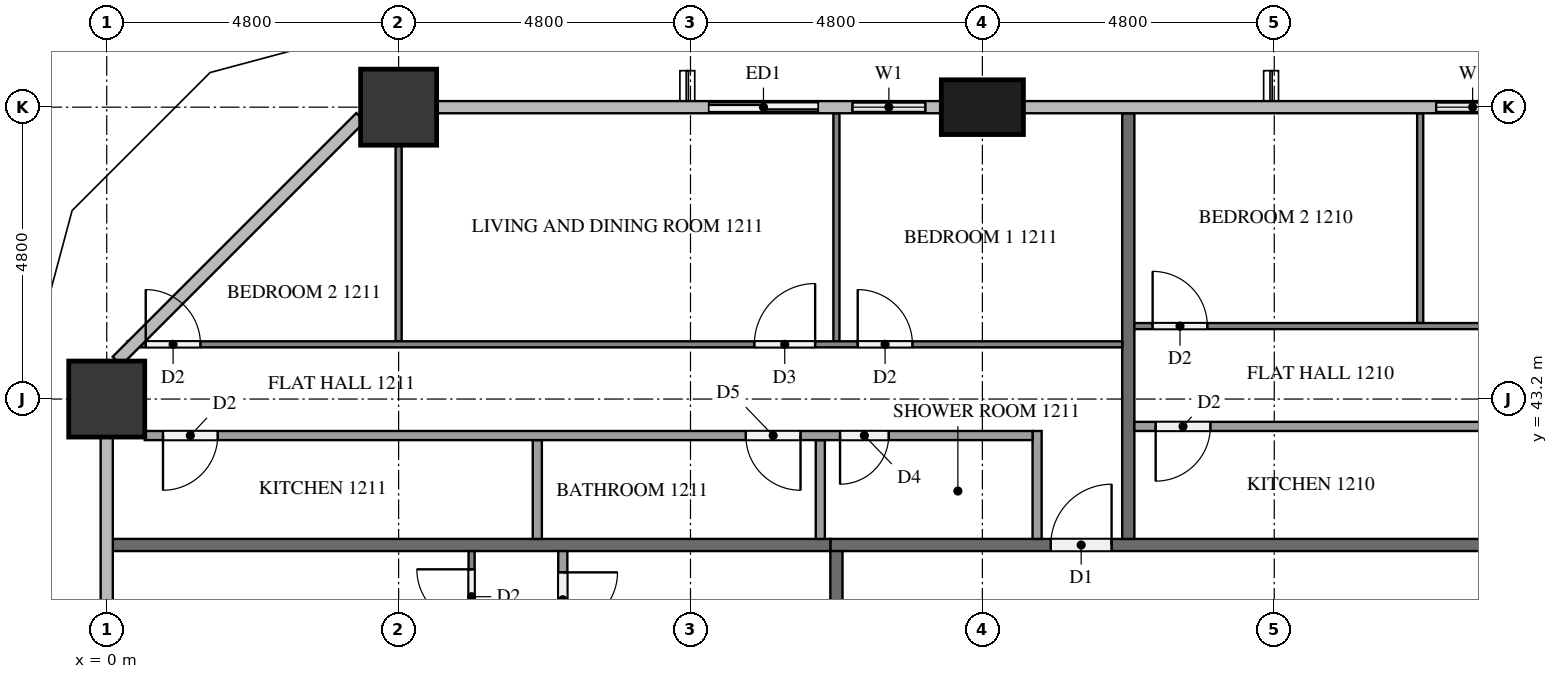
"""IFC4 building model, lengths in metres.
Left out: names, types, materials, properties, quantities, classifications, styles, units other than length and angle.
Written with IfcOpenShell. Run it as: python <this file> out.ifc"""

import sys

from ifc_helpers import new_model, si_unit, direction, frame, frame_2d, origin, origin_2d, place, context, subcontext, project, spatial, rectangle, extrude, element, fill, save


model = new_model("IFC4")
c1 = context("Model", 3, precision=1e-05, world=origin(), true_north=direction((0.0, 1.0)))
c2 = subcontext(c1, "Body", "Model", "MODEL_VIEW")
j1 = project(units=[si_unit("LENGTHUNIT", "METRE"), si_unit("PLANEANGLEUNIT", "RADIAN")], contexts=[c1])
p1 = place(None, origin())
s1 = spatial("IfcSite", under=j1, at=p1, CompositionType="ELEMENT")
p2 = place(p1, origin())
s2 = spatial("IfcBuilding", under=s1, at=p2, CompositionType="ELEMENT")
p3 = place(p2, frame((0.0, 0.0, 50.4)))
s3 = spatial("IfcBuildingStorey", under=s2, at=p3, CompositionType="ELEMENT", Elevation=50.4)
p4 = place(p3, frame((14.4, 48.0, 0.0), z_axis=(0.0, 0.0, 1.0), x_axis=(1.0, 0.0, 0.0)))
e1 = element("IfcColumn", 1, at=p4, inside=s3, PredefinedType="COLUMN", context=c2, shape_type="SweptSolid", body=[
    extrude(rectangle(XDim=1.35, YDim=0.9, at=origin_2d()), origin(), (0.0, 0.0, 1.0), 3.1),
])
for number, where, z_axis, x_axis in (
    (2, (4.8, 48.0, 0.0), (0.0, 0.0, 1.0), (1.0, 0.0, 0.0)),
    (3, (0.0, 43.2, 0.0), (0.0, 0.0, 1.0), (1.0, 0.0, 0.0)),
):
    element("IfcColumn", number, at=place(p3, frame(where, z_axis=z_axis, x_axis=x_axis)), inside=s3, PredefinedType="COLUMN", context=c2, shape_type="SweptSolid", body=[
        extrude(rectangle(XDim=1.25, YDim=1.25, at=origin_2d()), origin(), (0.0, 0.0, 1.0), 3.1),
    ])
p5 = place(p3, frame((23.325, 48.0, 0.0), z_axis=(0.0, 0.0, 1.0), x_axis=(-1.0, 0.0, 0.0)))
e4 = element("IfcWall", 4, at=p5, inside=s3, PredefinedType="SOLIDWALL", context=c2, shape_type="SweptSolid", body=[
    extrude(rectangle(XDim=1.725, YDim=0.15, at=frame_2d((0.862, 0.0))), origin(), (0.0, 0.0, 1.0), 3.1),
])
p6 = place(p5, frame((0.262, 0.0, 0.9)))
e5 = element("IfcOpeningElement", 5, at=p6, cuts=e4, PredefinedType="OPENING", context=c2, shape_type="SweptSolid", body=[
    extrude(rectangle(XDim=1.2, YDim=1.4, at=frame_2d((0.6, 0.7))), frame((0.0, 0.085, 0.0), z_axis=(0.0, -1.0, 0.0), x_axis=(1.0, 0.0, 0.0)), (0.0, 0.0, 1.0), 0.17),
])
p7 = place(p3, frame((13.725, 48.0, 0.0), z_axis=(0.0, 0.0, 1.0), x_axis=(-1.0, 0.0, 0.0)))
e6 = element("IfcWall", 6, at=p7, inside=s3, PredefinedType="SOLIDWALL", context=c2, shape_type="SweptSolid", body=[
    extrude(rectangle(XDim=4.125, YDim=0.15, at=frame_2d((2.062, 0.0))), origin(), (0.0, 0.0, 1.0), 3.1),
])
p8 = place(p7, frame((0.262, 0.0, 0.9)))
e7 = element("IfcOpeningElement", 7, at=p8, cuts=e6, PredefinedType="OPENING", context=c2, shape_type="SweptSolid", body=[
    extrude(rectangle(XDim=1.2, YDim=1.4, at=frame_2d((0.6, 0.7))), frame((0.0, 0.085, 0.0), z_axis=(0.0, -1.0, 0.0), x_axis=(1.0, 0.0, 0.0)), (0.0, 0.0, 1.0), 0.17),
])
p9 = place(p7, frame((2.025, 0.0, 0.0)))
e8 = element("IfcOpeningElement", 8, at=p9, cuts=e6, PredefinedType="OPENING", context=c2, shape_type="SweptSolid", body=[
    extrude(rectangle(XDim=1.8, YDim=2.4, at=frame_2d((0.9, 1.2))), frame((0.0, 0.085, 0.0), z_axis=(0.0, -1.0, 0.0), x_axis=(1.0, 0.0, 0.0)), (0.0, 0.0, 1.0), 0.17),
])
p10 = place(p3, frame((11.9, 40.8, 0.0), z_axis=(0.0, 0.0, 1.0), x_axis=(1.0, 0.0, 0.0)))
e9 = element("IfcWall", 9, at=p10, inside=s3, PredefinedType="PARTITIONING", context=c2, shape_type="SweptSolid", body=[
    extrude(rectangle(XDim=38.6, YDim=0.2, at=frame_2d((19.3, 0.0))), origin(), (0.0, 0.0, 1.0), 3.1),
])
p11 = place(p10, frame((33.975, 0.0, 0.0)))
e10 = element("IfcOpeningElement", 10, at=p11, cuts=e9, PredefinedType="OPENING", context=c2, shape_type="SweptSolid", body=[
    extrude(rectangle(XDim=1.0, YDim=2.1, at=frame_2d((0.5, 1.05))), frame((0.0, 0.11, 0.0), z_axis=(0.0, -1.0, 0.0), x_axis=(1.0, 0.0, 0.0)), (0.0, 0.0, 1.0), 0.22),
])
p12 = place(p10, frame((19.575, 0.0, 0.0)))
e11 = element("IfcOpeningElement", 11, at=p12, cuts=e9, PredefinedType="OPENING", context=c2, shape_type="SweptSolid", body=[
    extrude(rectangle(XDim=1.0, YDim=2.1, at=frame_2d((0.5, 1.05))), frame((0.0, 0.11, 0.0), z_axis=(0.0, -1.0, 0.0), x_axis=(1.0, 0.0, 0.0)), (0.0, 0.0, 1.0), 0.22),
])
p13 = place(p10, frame((18.025, 0.0, 0.0)))
e12 = element("IfcOpeningElement", 12, at=p13, cuts=e9, PredefinedType="OPENING", context=c2, shape_type="SweptSolid", body=[
    extrude(rectangle(XDim=1.0, YDim=2.1, at=frame_2d((0.5, 1.05))), frame((0.0, 0.11, 0.0), z_axis=(0.0, -1.0, 0.0), x_axis=(1.0, 0.0, 0.0)), (0.0, 0.0, 1.0), 0.22),
])
p14 = place(p10, frame((3.625, 0.0, 0.0)))
e13 = element("IfcOpeningElement", 13, at=p14, cuts=e9, PredefinedType="OPENING", context=c2, shape_type="SweptSolid", body=[
    extrude(rectangle(XDim=1.0, YDim=2.1, at=frame_2d((0.5, 1.05))), frame((0.0, 0.11, 0.0), z_axis=(0.0, -1.0, 0.0), x_axis=(1.0, 0.0, 0.0)), (0.0, 0.0, 1.0), 0.22),
])
p15 = place(p3, frame((12.0, 12.1, 0.0), z_axis=(0.0, 0.0, 1.0), x_axis=(0.0, 1.0, 0.0)))
e14 = element("IfcWall", 14, at=p15, inside=s3, PredefinedType="PARTITIONING", context=c2, shape_type="SweptSolid", body=[
    extrude(rectangle(XDim=28.6, YDim=0.2, at=frame_2d((14.3, 0.0))), origin(), (0.0, 0.0, 1.0), 3.1),
])
p16 = place(p15, frame((12.175, 0.0, 0.0)))
e15 = element("IfcOpeningElement", 15, at=p16, cuts=e14, PredefinedType="OPENING", context=c2, shape_type="SweptSolid", body=[
    extrude(rectangle(XDim=1.0, YDim=2.1, at=frame_2d((0.5, 1.05))), frame((0.0, 0.11, 0.0), z_axis=(0.0, -1.0, 0.0), x_axis=(1.0, 0.0, 0.0)), (0.0, 0.0, 1.0), 0.22),
])
p17 = place(p15, frame((10.625, 0.0, 0.0)))
e16 = element("IfcOpeningElement", 16, at=p17, cuts=e14, PredefinedType="OPENING", context=c2, shape_type="SweptSolid", body=[
    extrude(rectangle(XDim=1.0, YDim=2.1, at=frame_2d((0.5, 1.05))), frame((0.0, 0.11, 0.0), z_axis=(0.0, -1.0, 0.0), x_axis=(1.0, 0.0, 0.0)), (0.0, 0.0, 1.0), 0.22),
])
p18 = place(p3, frame((16.8, 47.9, 0.0), z_axis=(0.0, 0.0, 1.0), x_axis=(0.0, -1.0, 0.0)))
e17 = element("IfcWall", 17, at=p18, inside=s3, PredefinedType="PARTITIONING", context=c2, shape_type="SweptSolid", body=[
    extrude(rectangle(XDim=7.0, YDim=0.2, at=frame_2d((3.5, 0.0))), origin(), (0.0, 0.0, 1.0), 3.1),
])
p19 = place(p3, frame((0.1, 40.8, 0.0), z_axis=(0.0, 0.0, 1.0), x_axis=(1.0, 0.0, 0.0)))
e18 = element("IfcWall", 18, at=p19, inside=s3, PredefinedType="PARTITIONING", context=c2, shape_type="SweptSolid", body=[
    extrude(rectangle(XDim=11.8, YDim=0.2, at=frame_2d((5.9, 0.0))), origin(), (0.0, 0.0, 1.0), 3.1),
])
p20 = place(p3, frame((21.6, 44.45, 0.0), z_axis=(0.0, 0.0, 1.0), x_axis=(0.0, 1.0, 0.0)))
e19 = element("IfcWall", 19, at=p20, inside=s3, PredefinedType="PARTITIONING", context=c2, shape_type="SweptSolid", body=[
    extrude(rectangle(XDim=3.45, YDim=0.1, at=frame_2d((1.725, 0.0))), origin(), (0.0, 0.0, 1.0), 3.1),
])
p21 = place(p3, frame((16.9, 44.4, 0.0), z_axis=(0.0, 0.0, 1.0), x_axis=(1.0, 0.0, 0.0)))
e20 = element("IfcWall", 20, at=p21, inside=s3, PredefinedType="PARTITIONING", context=c2, shape_type="SweptSolid", body=[
    extrude(rectangle(XDim=14.2, YDim=0.1, at=frame_2d((7.1, 0.0))), origin(), (0.0, 0.0, 1.0), 3.1),
])
p22 = place(p21, frame((9.85, 0.0, 0.0)))
e21 = element("IfcOpeningElement", 21, at=p22, cuts=e20, PredefinedType="OPENING", context=c2, shape_type="SweptSolid", body=[
    extrude(rectangle(XDim=1.0, YDim=2.1, at=frame_2d((0.5, 1.05))), frame((0.0, 0.06, 0.0), z_axis=(0.0, -1.0, 0.0), x_axis=(1.0, 0.0, 0.0)), (0.0, 0.0, 1.0), 0.12),
])
p23 = place(p21, frame((8.25, 0.0, 0.0)))
e22 = element("IfcOpeningElement", 22, at=p23, cuts=e20, PredefinedType="OPENING", context=c2, shape_type="SweptSolid", body=[
    extrude(rectangle(XDim=0.9, YDim=2.1, at=frame_2d((0.45, 1.05))), frame((0.0, 0.06, 0.0), z_axis=(0.0, -1.0, 0.0), x_axis=(1.0, 0.0, 0.0)), (0.0, 0.0, 1.0), 0.12),
])
p24 = place(p21, frame((0.3, 0.0, 0.0)))
e23 = element("IfcOpeningElement", 23, at=p24, cuts=e20, PredefinedType="OPENING", context=c2, shape_type="SweptSolid", body=[
    extrude(rectangle(XDim=0.9, YDim=2.1, at=frame_2d((0.45, 1.05))), frame((0.0, 0.06, 0.0), z_axis=(0.0, -1.0, 0.0), x_axis=(1.0, 0.0, 0.0)), (0.0, 0.0, 1.0), 0.12),
])
p25 = place(p3, frame((29.625, 42.75, 0.0), z_axis=(0.0, 0.0, 1.0), x_axis=(-1.0, 0.0, 0.0)))
e24 = element("IfcWall", 24, at=p25, inside=s3, PredefinedType="PARTITIONING", context=c2, shape_type="SweptSolid", body=[
    extrude(rectangle(XDim=12.725, YDim=0.15, at=frame_2d((6.363, 0.0))), origin(), (0.0, 0.0, 1.0), 3.1),
])
p26 = place(p25, frame((1.812, 0.0, 0.0)))
e25 = element("IfcOpeningElement", 25, at=p26, cuts=e24, PredefinedType="OPENING", context=c2, shape_type="SweptSolid", body=[
    extrude(rectangle(XDim=0.8, YDim=2.1, at=frame_2d((0.4, 1.05))), frame((0.0, 0.085, 0.0), z_axis=(0.0, -1.0, 0.0), x_axis=(1.0, 0.0, 0.0)), (0.0, 0.0, 1.0), 0.17),
])
p27 = place(p25, frame((3.261, 0.0, 0.0)))
e26 = element("IfcOpeningElement", 26, at=p27, cuts=e24, PredefinedType="OPENING", context=c2, shape_type="SweptSolid", body=[
    extrude(rectangle(XDim=0.9, YDim=2.1, at=frame_2d((0.45, 1.05))), frame((0.0, 0.085, 0.0), z_axis=(0.0, -1.0, 0.0), x_axis=(1.0, 0.0, 0.0)), (0.0, 0.0, 1.0), 0.17),
])
p28 = place(p25, frame((11.475, 0.0, 0.0)))
e27 = element("IfcOpeningElement", 27, at=p28, cuts=e24, PredefinedType="OPENING", context=c2, shape_type="SweptSolid", body=[
    extrude(rectangle(XDim=0.9, YDim=2.1, at=frame_2d((0.45, 1.05))), frame((0.0, 0.085, 0.0), z_axis=(0.0, -1.0, 0.0), x_axis=(1.0, 0.0, 0.0)), (0.0, 0.0, 1.0), 0.17),
])
p29 = place(p3, frame((12.0, 44.15, 0.0), z_axis=(0.0, 0.0, 1.0), x_axis=(0.0, 1.0, 0.0)))
e28 = element("IfcWall", 28, at=p29, inside=s3, PredefinedType="PARTITIONING", context=c2, shape_type="SweptSolid", body=[
    extrude(rectangle(XDim=3.75, YDim=0.1, at=frame_2d((1.875, 0.0))), origin(), (0.0, 0.0, 1.0), 3.1),
])
p30 = place(p3, frame((4.8, 44.15, 0.0), z_axis=(0.0, 0.0, 1.0), x_axis=(0.0, 1.0, 0.0)))
e29 = element("IfcWall", 29, at=p30, inside=s3, PredefinedType="PARTITIONING", context=c2, shape_type="SweptSolid", body=[
    extrude(rectangle(XDim=3.225, YDim=0.1, at=frame_2d((1.613, 0.0))), origin(), (0.0, 0.0, 1.0), 3.1),
])
p31 = place(p3, frame((0.341, 44.1, 0.0), z_axis=(0.0, 0.0, 1.0), x_axis=(1.0, 0.0, 0.0)))
e30 = element("IfcWall", 30, at=p31, inside=s3, PredefinedType="PARTITIONING", context=c2, shape_type="SweptSolid", body=[
    extrude(rectangle(XDim=16.359, YDim=0.1, at=frame_2d((8.179, 0.0))), origin(), (0.0, 0.0, 1.0), 3.1),
])
p32 = place(p31, frame((12.009, 0.0, 0.0)))
e31 = element("IfcOpeningElement", 31, at=p32, cuts=e30, PredefinedType="OPENING", context=c2, shape_type="SweptSolid", body=[
    extrude(rectangle(XDim=0.9, YDim=2.1, at=frame_2d((0.45, 1.05))), frame((0.0, 0.06, 0.0), z_axis=(0.0, -1.0, 0.0), x_axis=(1.0, 0.0, 0.0)), (0.0, 0.0, 1.0), 0.12),
])
p33 = place(p31, frame((10.309, 0.0, 0.0)))
e32 = element("IfcOpeningElement", 32, at=p33, cuts=e30, PredefinedType="OPENING", context=c2, shape_type="SweptSolid", body=[
    extrude(rectangle(XDim=1.0, YDim=2.1, at=frame_2d((0.5, 1.05))), frame((0.0, 0.06, 0.0), z_axis=(0.0, -1.0, 0.0), x_axis=(1.0, 0.0, 0.0)), (0.0, 0.0, 1.0), 0.12),
])
p34 = place(p31, frame((0.3, 0.0, 0.0)))
e33 = element("IfcOpeningElement", 33, at=p34, cuts=e30, PredefinedType="OPENING", context=c2, shape_type="SweptSolid", body=[
    extrude(rectangle(XDim=0.9, YDim=2.1, at=frame_2d((0.45, 1.05))), frame((0.0, 0.06, 0.0), z_axis=(0.0, -1.0, 0.0), x_axis=(1.0, 0.0, 0.0)), (0.0, 0.0, 1.0), 0.12),
])
for number, where, z_axis, x_axis in (
    (34, (11.735, 40.9, 0.0), (0.0, 0.0, 1.0), (0.0, 1.0, 0.0)),
    (35, (7.081, 40.9, 0.0), (0.0, 0.0, 1.0), (0.0, 1.0, 0.0)),
):
    element("IfcWall", number, at=place(p3, frame(where, z_axis=z_axis, x_axis=x_axis)), inside=s3, PredefinedType="PARTITIONING", context=c2, shape_type="SweptSolid", body=[
        extrude(rectangle(XDim=1.625, YDim=0.15, at=frame_2d((0.812, 0.0))), origin(), (0.0, 0.0, 1.0), 3.1),
    ])
p35 = place(p3, frame((15.3, 40.9, 0.0), z_axis=(0.0, 0.0, 1.0), x_axis=(0.0, 1.0, 0.0)))
e36 = element("IfcWall", 36, at=p35, inside=s3, PredefinedType="PARTITIONING", context=c2, shape_type="SweptSolid", body=[
    extrude(rectangle(XDim=1.775, YDim=0.15, at=frame_2d((0.888, 0.0))), origin(), (0.0, 0.0, 1.0), 3.1),
])
p36 = place(p3, frame((15.225, 42.6, 0.0), z_axis=(0.0, 0.0, 1.0), x_axis=(-1.0, 0.0, 0.0)))
e37 = element("IfcWall", 37, at=p36, inside=s3, PredefinedType="PARTITIONING", context=c2, shape_type="SweptSolid", body=[
    extrude(rectangle(XDim=14.6, YDim=0.15, at=frame_2d((7.3, 0.0))), origin(), (0.0, 0.0, 1.0), 3.1),
])
p37 = place(p36, frame((2.365, 0.0, 0.0)))
e38 = element("IfcOpeningElement", 38, at=p37, cuts=e37, PredefinedType="OPENING", context=c2, shape_type="SweptSolid", body=[
    extrude(rectangle(XDim=0.8, YDim=2.1, at=frame_2d((0.4, 1.05))), frame((0.0, 0.085, 0.0), z_axis=(0.0, -1.0, 0.0), x_axis=(1.0, 0.0, 0.0)), (0.0, 0.0, 1.0), 0.17),
])
p38 = place(p36, frame((3.815, 0.0, 0.0)))
e39 = element("IfcOpeningElement", 39, at=p38, cuts=e37, PredefinedType="OPENING", context=c2, shape_type="SweptSolid", body=[
    extrude(rectangle(XDim=0.9, YDim=2.1, at=frame_2d((0.45, 1.05))), frame((0.0, 0.085, 0.0), z_axis=(0.0, -1.0, 0.0), x_axis=(1.0, 0.0, 0.0)), (0.0, 0.0, 1.0), 0.17),
])
p39 = place(p36, frame((13.4, 0.0, 0.0)))
e40 = element("IfcOpeningElement", 40, at=p39, cuts=e37, PredefinedType="OPENING", context=c2, shape_type="SweptSolid", body=[
    extrude(rectangle(XDim=0.9, YDim=2.1, at=frame_2d((0.45, 1.05))), frame((0.0, 0.085, 0.0), z_axis=(0.0, -1.0, 0.0), x_axis=(1.0, 0.0, 0.0)), (0.0, 0.0, 1.0), 0.17),
])
p40 = place(p3, frame((6.0, 24.1, 0.0), z_axis=(0.0, 0.0, 1.0), x_axis=(0.0, 1.0, 0.0)))
e41 = element("IfcWall", 41, at=p40, inside=s3, PredefinedType="PARTITIONING", context=c2, shape_type="SweptSolid", body=[
    extrude(rectangle(XDim=16.6, YDim=0.1, at=frame_2d((8.3, 0.0))), origin(), (0.0, 0.0, 1.0), 3.1),
])
p41 = place(p40, frame((5.75, 0.0, 0.0)))
e42 = element("IfcOpeningElement", 42, at=p41, cuts=e41, PredefinedType="OPENING", context=c2, shape_type="SweptSolid", body=[
    extrude(rectangle(XDim=1.0, YDim=2.1, at=frame_2d((0.5, 1.05))), frame((0.0, 0.06, 0.0), z_axis=(0.0, -1.0, 0.0), x_axis=(1.0, 0.0, 0.0)), (0.0, 0.0, 1.0), 0.12),
])
p42 = place(p40, frame((7.45, 0.0, 0.0)))
e43 = element("IfcOpeningElement", 43, at=p42, cuts=e41, PredefinedType="OPENING", context=c2, shape_type="SweptSolid", body=[
    extrude(rectangle(XDim=0.9, YDim=2.1, at=frame_2d((0.45, 1.05))), frame((0.0, 0.06, 0.0), z_axis=(0.0, -1.0, 0.0), x_axis=(1.0, 0.0, 0.0)), (0.0, 0.0, 1.0), 0.12),
])
p43 = place(p40, frame((15.4, 0.0, 0.0)))
e44 = element("IfcOpeningElement", 44, at=p43, cuts=e41, PredefinedType="OPENING", context=c2, shape_type="SweptSolid", body=[
    extrude(rectangle(XDim=0.9, YDim=2.1, at=frame_2d((0.45, 1.05))), frame((0.0, 0.06, 0.0), z_axis=(0.0, -1.0, 0.0), x_axis=(1.0, 0.0, 0.0)), (0.0, 0.0, 1.0), 0.12),
])
p44 = place(p3, frame((7.5, 40.7, 0.0), z_axis=(0.0, 0.0, 1.0), x_axis=(0.0, -1.0, 0.0)))
e45 = element("IfcWall", 45, at=p44, inside=s3, PredefinedType="PARTITIONING", context=c2, shape_type="SweptSolid", body=[
    extrude(rectangle(XDim=15.125, YDim=0.15, at=frame_2d((7.562, 0.0))), origin(), (0.0, 0.0, 1.0), 3.1),
])
p45 = place(p44, frame((11.96, 0.0, 0.0)))
e46 = element("IfcOpeningElement", 46, at=p45, cuts=e45, PredefinedType="OPENING", context=c2, shape_type="SweptSolid", body=[
    extrude(rectangle(XDim=0.8, YDim=2.1, at=frame_2d((0.4, 1.05))), frame((0.0, 0.085, 0.0), z_axis=(0.0, -1.0, 0.0), x_axis=(1.0, 0.0, 0.0)), (0.0, 0.0, 1.0), 0.17),
])
p46 = place(p44, frame((10.41, 0.0, 0.0)))
e47 = element("IfcOpeningElement", 47, at=p46, cuts=e45, PredefinedType="OPENING", context=c2, shape_type="SweptSolid", body=[
    extrude(rectangle(XDim=0.9, YDim=2.1, at=frame_2d((0.45, 1.05))), frame((0.0, 0.085, 0.0), z_axis=(0.0, -1.0, 0.0), x_axis=(1.0, 0.0, 0.0)), (0.0, 0.0, 1.0), 0.17),
])
p47 = place(p44, frame((0.35, 0.0, 0.0)))
e48 = element("IfcOpeningElement", 48, at=p47, cuts=e45, PredefinedType="OPENING", context=c2, shape_type="SweptSolid", body=[
    extrude(rectangle(XDim=0.9, YDim=2.1, at=frame_2d((0.45, 1.05))), frame((0.0, 0.085, 0.0), z_axis=(0.0, -1.0, 0.0), x_axis=(1.0, 0.0, 0.0)), (0.0, 0.0, 1.0), 0.17),
])
p48 = place(p6, origin())
e49 = element("IfcWindow", 49, at=p48, inside=s3, PartitioningType="SINGLE_PANEL", PredefinedType="WINDOW", context=c2, shape_type="SweptSolid", body=[
    extrude(rectangle(XDim=1.2, YDim=1.4, at=frame_2d((0.6, 0.7))), frame((0.0, 0.03, 0.0), z_axis=(0.0, -1.0, 0.0), x_axis=(1.0, 0.0, 0.0)), (0.0, 0.0, 1.0), 0.06),
])
fill(e5, e49)
p49 = place(p8, origin())
e50 = element("IfcWindow", 50, at=p49, inside=s3, PartitioningType="SINGLE_PANEL", PredefinedType="WINDOW", context=c2, shape_type="SweptSolid", body=[
    extrude(rectangle(XDim=1.2, YDim=1.4, at=frame_2d((0.6, 0.7))), frame((0.0, 0.03, 0.0), z_axis=(0.0, -1.0, 0.0), x_axis=(1.0, 0.0, 0.0)), (0.0, 0.0, 1.0), 0.06),
])
fill(e7, e50)
p50 = place(p9, origin())
e51 = element("IfcDoor", 51, at=p50, inside=s3, OperationType="SLIDING_TO_RIGHT", PredefinedType="DOOR", context=c2, shape_type="SweptSolid", body=[
    extrude(rectangle(XDim=1.8, YDim=2.4, at=frame_2d((0.9, 1.2))), frame((0.0, 0.025, 0.0), z_axis=(0.0, -1.0, 0.0), x_axis=(1.0, 0.0, 0.0)), (0.0, 0.0, 1.0), 0.05),
])
fill(e8, e51)
p51 = place(p14, origin())
e52 = element("IfcDoor", 52, at=p51, inside=s3, OperationType="SINGLE_SWING_RIGHT", PredefinedType="DOOR", context=c2, shape_type="SweptSolid", body=[
    extrude(rectangle(XDim=1.0, YDim=2.1, at=frame_2d((0.5, 1.05))), frame((0.0, 0.025, 0.0), z_axis=(0.0, -1.0, 0.0), x_axis=(1.0, 0.0, 0.0)), (0.0, 0.0, 1.0), 0.05),
])
fill(e13, e52)
p52 = place(p24, origin())
e53 = element("IfcDoor", 53, at=p52, inside=s3, OperationType="SINGLE_SWING_LEFT", PredefinedType="DOOR", context=c2, shape_type="SweptSolid", body=[
    extrude(rectangle(XDim=0.9, YDim=2.1, at=frame_2d((0.45, 1.05))), frame((0.0, 0.025, 0.0), z_axis=(0.0, -1.0, 0.0), x_axis=(1.0, 0.0, 0.0)), (0.0, 0.0, 1.0), 0.05),
])
fill(e23, e53)
p53 = place(p28, origin())
e54 = element("IfcDoor", 54, at=p53, inside=s3, OperationType="SINGLE_SWING_RIGHT", PredefinedType="DOOR", context=c2, shape_type="SweptSolid", body=[
    extrude(rectangle(XDim=0.9, YDim=2.1, at=frame_2d((0.45, 1.05))), frame((0.0, 0.025, 0.0), z_axis=(0.0, -1.0, 0.0), x_axis=(1.0, 0.0, 0.0)), (0.0, 0.0, 1.0), 0.05),
])
fill(e27, e54)
p54 = place(p32, origin())
e55 = element("IfcDoor", 55, at=p54, inside=s3, OperationType="SINGLE_SWING_LEFT", PredefinedType="DOOR", context=c2, shape_type="SweptSolid", body=[
    extrude(rectangle(XDim=0.9, YDim=2.1, at=frame_2d((0.45, 1.05))), frame((0.0, 0.025, 0.0), z_axis=(0.0, -1.0, 0.0), x_axis=(1.0, 0.0, 0.0)), (0.0, 0.0, 1.0), 0.05),
])
fill(e31, e55)
p55 = place(p33, origin())
e56 = element("IfcDoor", 56, at=p55, inside=s3, OperationType="SINGLE_SWING_RIGHT", PredefinedType="DOOR", context=c2, shape_type="SweptSolid", body=[
    extrude(rectangle(XDim=1.0, YDim=2.1, at=frame_2d((0.5, 1.05))), frame((0.0, 0.025, 0.0), z_axis=(0.0, -1.0, 0.0), x_axis=(1.0, 0.0, 0.0)), (0.0, 0.0, 1.0), 0.05),
])
fill(e32, e56)
p56 = place(p34, origin())
e57 = element("IfcDoor", 57, at=p56, inside=s3, OperationType="SINGLE_SWING_LEFT", PredefinedType="DOOR", context=c2, shape_type="SweptSolid", body=[
    extrude(rectangle(XDim=0.9, YDim=2.1, at=frame_2d((0.45, 1.05))), frame((0.0, 0.025, 0.0), z_axis=(0.0, -1.0, 0.0), x_axis=(1.0, 0.0, 0.0)), (0.0, 0.0, 1.0), 0.05),
])
fill(e33, e57)
p57 = place(p37, origin())
e58 = element("IfcDoor", 58, at=p57, inside=s3, OperationType="SINGLE_SWING_RIGHT", PredefinedType="DOOR", context=c2, shape_type="SweptSolid", body=[
    extrude(rectangle(XDim=0.8, YDim=2.1, at=frame_2d((0.4, 1.05))), frame((0.0, 0.025, 0.0), z_axis=(0.0, -1.0, 0.0), x_axis=(1.0, 0.0, 0.0)), (0.0, 0.0, 1.0), 0.05),
])
fill(e38, e58)
p58 = place(p38, origin())
e59 = element("IfcDoor", 59, at=p58, inside=s3, OperationType="SINGLE_SWING_LEFT", PredefinedType="DOOR", context=c2, shape_type="SweptSolid", body=[
    extrude(rectangle(XDim=0.9, YDim=2.1, at=frame_2d((0.45, 1.05))), frame((0.0, 0.025, 0.0), z_axis=(0.0, -1.0, 0.0), x_axis=(1.0, 0.0, 0.0)), (0.0, 0.0, 1.0), 0.05),
])
fill(e39, e59)
p59 = place(p39, origin())
e60 = element("IfcDoor", 60, at=p59, inside=s3, OperationType="SINGLE_SWING_RIGHT", PredefinedType="DOOR", context=c2, shape_type="SweptSolid", body=[
    extrude(rectangle(XDim=0.9, YDim=2.1, at=frame_2d((0.45, 1.05))), frame((0.0, 0.025, 0.0), z_axis=(0.0, -1.0, 0.0), x_axis=(1.0, 0.0, 0.0)), (0.0, 0.0, 1.0), 0.05),
])
fill(e40, e60)
p60 = place(p43, origin())
e61 = element("IfcDoor", 61, at=p60, inside=s3, OperationType="SINGLE_SWING_RIGHT", PredefinedType="DOOR", context=c2, shape_type="SweptSolid", body=[
    extrude(rectangle(XDim=0.9, YDim=2.1, at=frame_2d((0.45, 1.05))), frame((0.0, 0.025, 0.0), z_axis=(0.0, -1.0, 0.0), x_axis=(1.0, 0.0, 0.0)), (0.0, 0.0, 1.0), 0.05),
])
fill(e44, e61)
p61 = place(p47, origin())
e62 = element("IfcDoor", 62, at=p61, inside=s3, OperationType="SINGLE_SWING_LEFT", PredefinedType="DOOR", context=c2, shape_type="SweptSolid", body=[
    extrude(rectangle(XDim=0.9, YDim=2.1, at=frame_2d((0.45, 1.05))), frame((0.0, 0.025, 0.0), z_axis=(0.0, -1.0, 0.0), x_axis=(1.0, 0.0, 0.0)), (0.0, 0.0, 1.0), 0.05),
])
fill(e48, e62)
save(model, sys.argv[1])
